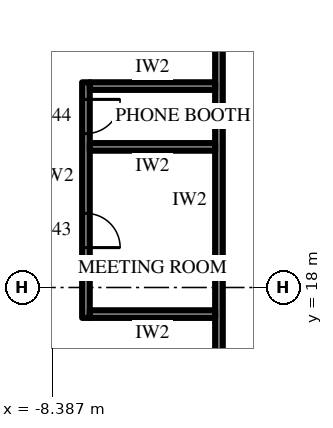
"""IFC4 building model, lengths in metres.
Left out: names, types, materials, properties, quantities, classifications, styles, units other than length and angle.
Written with IfcOpenShell. Run it as: python <this file> out.ifc"""

import sys

from ifc_helpers import new_model, si_unit, direction, frame, frame_2d, origin, place, context, subcontext, project, spatial, rectangle, extrude, element, fill, save


model = new_model("IFC4")
c1 = context("Model", 3, precision=1e-05, world=origin(), true_north=direction((0.0, 1.0)))
c2 = subcontext(c1, "Body", "Model", "MODEL_VIEW")
j1 = project(units=[si_unit("LENGTHUNIT", "METRE"), si_unit("PLANEANGLEUNIT", "RADIAN")], contexts=[c1])
p1 = place(None, origin())
s1 = spatial("IfcSite", under=j1, at=p1, CompositionType="ELEMENT")
p2 = place(p1, origin())
s2 = spatial("IfcBuilding", under=s1, at=p2, CompositionType="ELEMENT")
p3 = place(p2, frame((0.0, 0.0, 65.5)))
s3 = spatial("IfcBuildingStorey", under=s2, at=p3, CompositionType="ELEMENT", Elevation=65.5)
p4 = place(p3, frame((-4.0, 14.2, 0.0), z_axis=(0.0, 0.0, 1.0), x_axis=(0.0, 1.0, 0.0)))
e1 = element("IfcWall", 1, at=p4, inside=s3, PredefinedType="PARTITIONING", context=c2, shape_type="SweptSolid", body=[
    extrude(rectangle(XDim=12.2, YDim=0.2, at=frame_2d((6.1, 0.0))), origin(), (0.0, 0.0, 1.0), 4.0),
])
p5 = place(p4, frame((0.72, 0.0, 0.0)))
e2 = element("IfcOpeningElement", 2, at=p5, cuts=e1, PredefinedType="OPENING", context=c2, shape_type="SweptSolid", body=[
    extrude(rectangle(XDim=1.0, YDim=2.2, at=frame_2d((0.5, 1.1))), frame((0.0, 0.11, 0.0), z_axis=(0.0, -1.0, 0.0), x_axis=(1.0, 0.0, 0.0)), (0.0, 0.0, 1.0), 0.22),
])
p6 = place(p3, frame((-7.5, 17.2, 0.0), z_axis=(0.0, 0.0, 1.0), x_axis=(0.0, 1.0, 0.0)))
e3 = element("IfcWall", 3, at=p6, inside=s3, PredefinedType="PARTITIONING", context=c2, shape_type="SweptSolid", body=[
    extrude(rectangle(XDim=6.2, YDim=0.2, at=frame_2d((3.1, 0.0))), origin(), (0.0, 0.0, 1.0), 4.0),
])
p7 = place(p6, frame((1.85, 0.0, 0.0)))
e4 = element("IfcOpeningElement", 4, at=p7, cuts=e3, PredefinedType="OPENING", context=c2, shape_type="SweptSolid", body=[
    extrude(rectangle(XDim=0.9, YDim=2.2, at=frame_2d((0.45, 1.1))), frame((0.0, 0.11, 0.0), z_axis=(0.0, -1.0, 0.0), x_axis=(1.0, 0.0, 0.0)), (0.0, 0.0, 1.0), 0.22),
])
p8 = place(p6, frame((4.85, 0.0, 0.0)))
e5 = element("IfcOpeningElement", 5, at=p8, cuts=e3, PredefinedType="OPENING", context=c2, shape_type="SweptSolid", body=[
    extrude(rectangle(XDim=0.9, YDim=2.2, at=frame_2d((0.45, 1.1))), frame((0.0, 0.11, 0.0), z_axis=(0.0, -1.0, 0.0), x_axis=(1.0, 0.0, 0.0)), (0.0, 0.0, 1.0), 0.22),
])
for number, where, z_axis, x_axis in (
    (6, (-4.1, 17.3, 0.0), (0.0, 0.0, 1.0), (-1.0, 0.0, 0.0)),
    (7, (-4.1, 21.7, 0.0), (0.0, 0.0, 1.0), (-1.0, 0.0, 0.0)),
    (8, (-4.1, 23.3, 0.0), (0.0, 0.0, 1.0), (-1.0, 0.0, 0.0)),
):
    element("IfcWall", number, at=place(p3, frame(where, z_axis=z_axis, x_axis=x_axis)), inside=s3, PredefinedType="PARTITIONING", context=c2, shape_type="SweptSolid", body=[
        extrude(rectangle(XDim=3.3, YDim=0.2, at=frame_2d((1.65, 0.0))), origin(), (0.0, 0.0, 1.0), 4.0),
    ])
p9 = place(p7, frame((0.9, 0.0, 0.0), z_axis=(0.0, 0.0, 1.0), x_axis=(-1.0, 0.0, 0.0)))
e9 = element("IfcDoor", 9, at=p9, inside=s3, OperationType="SINGLE_SWING_LEFT", PredefinedType="DOOR", context=c2, shape_type="SweptSolid", body=[
    extrude(rectangle(XDim=0.9, YDim=2.2, at=frame_2d((0.45, 1.1))), frame((0.0, 0.025, 0.0), z_axis=(0.0, -1.0, 0.0), x_axis=(1.0, 0.0, 0.0)), (0.0, 0.0, 1.0), 0.05),
])
fill(e4, e9)
p10 = place(p8, frame((0.9, 0.0, 0.0), z_axis=(0.0, 0.0, 1.0), x_axis=(-1.0, 0.0, 0.0)))
e10 = element("IfcDoor", 10, at=p10, inside=s3, OperationType="SINGLE_SWING_RIGHT", PredefinedType="DOOR", context=c2, shape_type="SweptSolid", body=[
    extrude(rectangle(XDim=0.9, YDim=2.2, at=frame_2d((0.45, 1.1))), frame((0.0, 0.025, 0.0), z_axis=(0.0, -1.0, 0.0), x_axis=(1.0, 0.0, 0.0)), (0.0, 0.0, 1.0), 0.05),
])
fill(e5, e10)
save(model, sys.argv[1])
